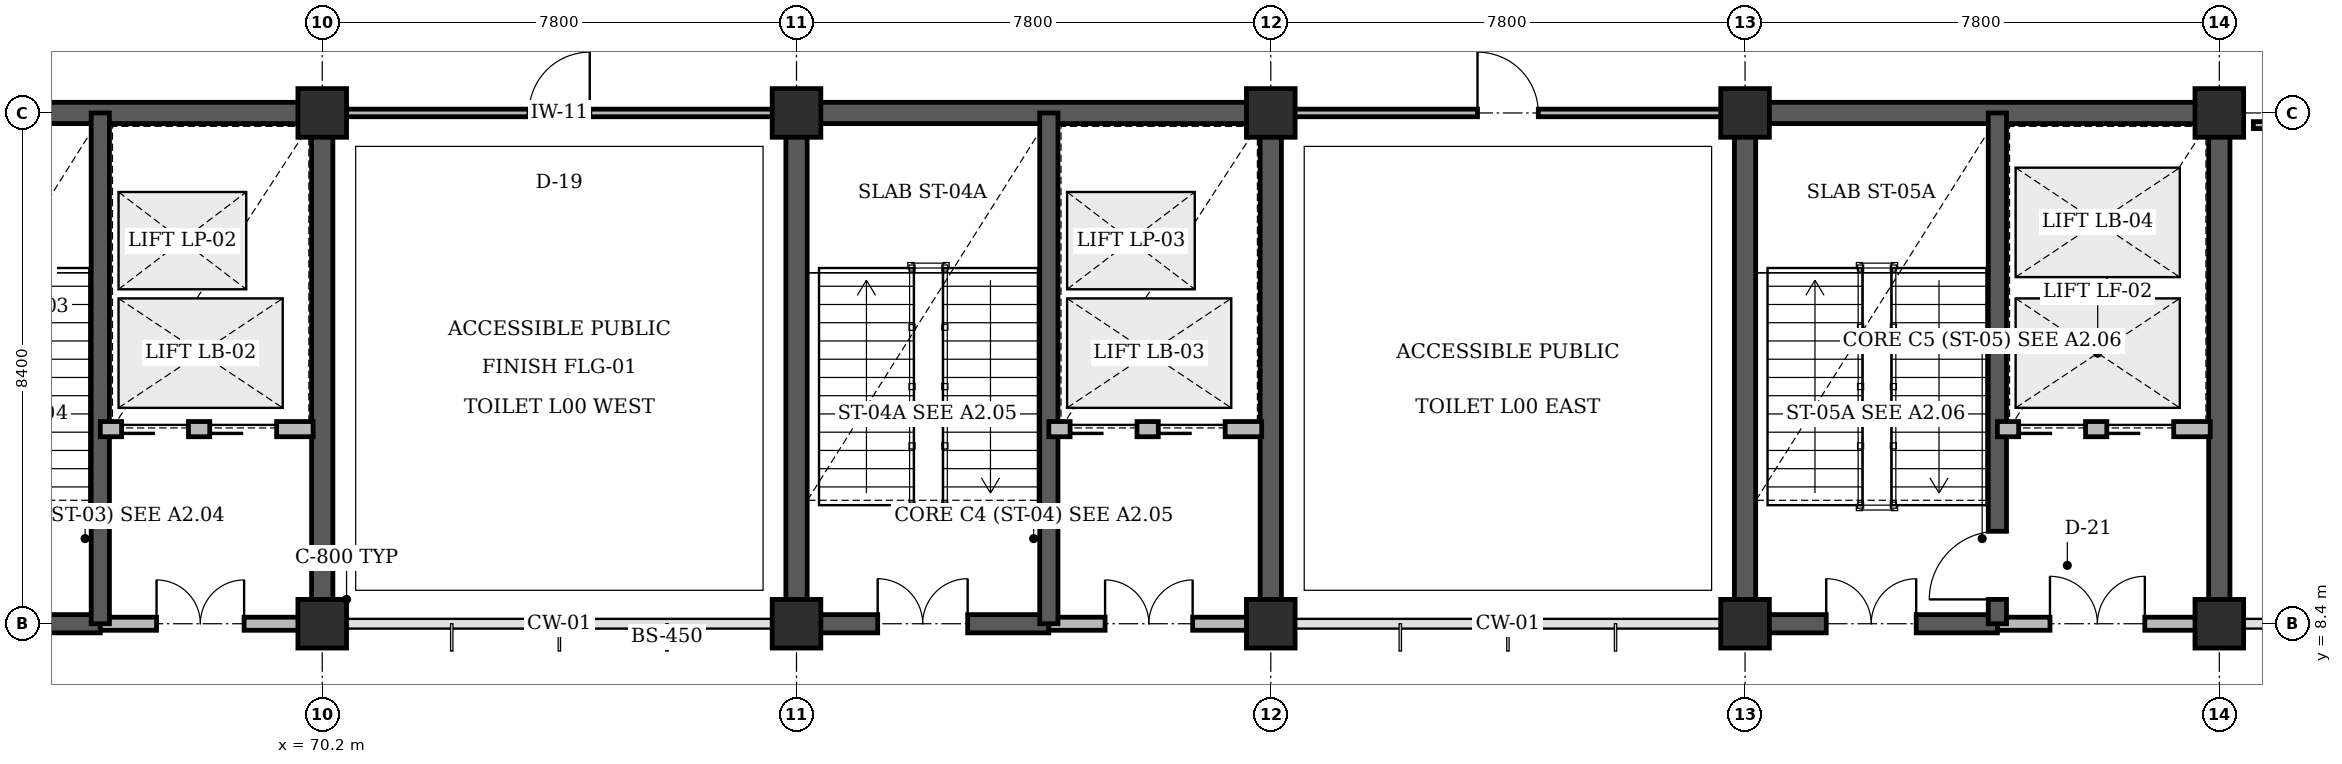
"""IFC4 building model, lengths in metres.
Left out: names, types, materials, properties, quantities, classifications, styles, units other than length and angle.
Written with IfcOpenShell. Run it as: python <this file> out.ifc"""

import sys

from ifc_helpers import new_model, si_unit, direction, frame, frame_2d, origin, origin_2d, place, context, subcontext, project, spatial, rectangle, extrude, element, fill, save


model = new_model("IFC4")
c1 = context("Model", 3, precision=1e-05, world=origin(), true_north=direction((0.0, 1.0)))
c2 = subcontext(c1, "Body", "Model", "MODEL_VIEW")
j1 = project(units=[si_unit("LENGTHUNIT", "METRE"), si_unit("PLANEANGLEUNIT", "RADIAN")], contexts=[c1])
p1 = place(None, origin())
s1 = spatial("IfcSite", under=j1, at=p1, CompositionType="ELEMENT")
p2 = place(p1, origin())
s2 = spatial("IfcBuilding", under=s1, at=p2, CompositionType="ELEMENT")
p3 = place(p2, origin())
s3 = spatial("IfcBuildingStorey", under=s2, at=p3, CompositionType="ELEMENT", Elevation=0.0)
p4 = place(p3, frame((62.225, 16.8, 0.0), z_axis=(0.0, 0.0, 1.0), x_axis=(1.0, 0.0, 0.0)))
e1 = element("IfcWall", 1, at=p4, inside=s3, PredefinedType="SHEAR", context=c2, shape_type="SweptSolid", body=[
    extrude(rectangle(XDim=8.15, YDim=0.35, at=frame_2d((4.075, 0.0))), origin(), (0.0, 0.0, 1.0), 4.48),
])
p5 = place(p3, frame((70.2, 8.4, 0.0), z_axis=(0.0, 0.0, 1.0), x_axis=(0.0, 1.0, 0.0)))
e2 = element("IfcWall", 2, at=p5, inside=s3, PredefinedType="SHEAR", context=c2, shape_type="SweptSolid", body=[
    extrude(rectangle(XDim=8.4, YDim=0.35, at=frame_2d((4.2, 0.0))), origin(), (0.0, 0.0, 1.0), 4.48),
])
p6 = place(p3, frame((77.825, 16.8, 0.0), z_axis=(0.0, 0.0, 1.0), x_axis=(1.0, 0.0, 0.0)))
e3 = element("IfcWall", 3, at=p6, inside=s3, PredefinedType="SHEAR", context=c2, shape_type="SweptSolid", body=[
    extrude(rectangle(XDim=8.15, YDim=0.35, at=frame_2d((4.075, 0.0))), origin(), (0.0, 0.0, 1.0), 4.48),
])
for number, where, z_axis, x_axis in (
    (4, (78.0, 8.4, 0.0), (0.0, 0.0, 1.0), (0.0, 1.0, 0.0)),
    (5, (85.8, 8.4, 0.0), (0.0, 0.0, 1.0), (0.0, 1.0, 0.0)),
):
    element("IfcWall", number, at=place(p3, frame(where, z_axis=z_axis, x_axis=x_axis)), inside=s3, PredefinedType="SHEAR", context=c2, shape_type="SweptSolid", body=[
        extrude(rectangle(XDim=8.4, YDim=0.35, at=frame_2d((4.2, 0.0))), origin(), (0.0, 0.0, 1.0), 4.48),
    ])
p7 = place(p3, frame((93.425, 16.8, 0.0), z_axis=(0.0, 0.0, 1.0), x_axis=(1.0, 0.0, 0.0)))
e6 = element("IfcWall", 6, at=p7, inside=s3, PredefinedType="SHEAR", context=c2, shape_type="SweptSolid", body=[
    extrude(rectangle(XDim=8.15, YDim=0.35, at=frame_2d((4.075, 0.0))), origin(), (0.0, 0.0, 1.0), 4.48),
])
for number, where, z_axis, x_axis in (
    (7, (93.6, 8.4, 0.0), (0.0, 0.0, 1.0), (0.0, 1.0, 0.0)),
    (8, (101.4, 8.4, 0.0), (0.0, 0.0, 1.0), (0.0, 1.0, 0.0)),
):
    element("IfcWall", number, at=place(p3, frame(where, z_axis=z_axis, x_axis=x_axis)), inside=s3, PredefinedType="SHEAR", context=c2, shape_type="SweptSolid", body=[
        extrude(rectangle(XDim=8.4, YDim=0.35, at=frame_2d((4.2, 0.0))), origin(), (0.0, 0.0, 1.0), 4.48),
    ])
for number, where, z_axis, x_axis in (
    (9, (70.2, 8.4, 0.0), (0.0, 0.0, 1.0), (1.0, 0.0, 0.0)),
    (10, (70.2, 16.8, 0.0), (0.0, 0.0, 1.0), (1.0, 0.0, 0.0)),
    (11, (78.0, 8.4, 0.0), (0.0, 0.0, 1.0), (1.0, 0.0, 0.0)),
    (12, (78.0, 16.8, 0.0), (0.0, 0.0, 1.0), (1.0, 0.0, 0.0)),
    (13, (85.8, 8.4, 0.0), (0.0, 0.0, 1.0), (1.0, 0.0, 0.0)),
    (14, (85.8, 16.8, 0.0), (0.0, 0.0, 1.0), (1.0, 0.0, 0.0)),
    (15, (93.6, 8.4, 0.0), (0.0, 0.0, 1.0), (1.0, 0.0, 0.0)),
    (16, (93.6, 16.8, 0.0), (0.0, 0.0, 1.0), (1.0, 0.0, 0.0)),
    (17, (101.4, 8.4, 0.0), (0.0, 0.0, 1.0), (1.0, 0.0, 0.0)),
    (18, (101.4, 16.8, 0.0), (0.0, 0.0, 1.0), (1.0, 0.0, 0.0)),
):
    element("IfcColumn", number, at=place(p3, frame(where, z_axis=z_axis, x_axis=x_axis)), inside=s3, PredefinedType="COLUMN", context=c2, shape_type="SweptSolid", body=[
        extrude(rectangle(XDim=0.8, YDim=0.8, at=origin_2d()), origin(), (0.0, 0.0, 1.0), 4.8),
    ])
p8 = place(p3, frame((62.4, 8.4, 0.0), z_axis=(0.0, 0.0, 1.0), x_axis=(1.0, 0.0, 0.0)))
e19 = element("IfcWall", 19, at=p8, inside=s3, PredefinedType="SHEAR", context=c2, shape_type="SweptSolid", body=[
    extrude(rectangle(XDim=4.15, YDim=0.3, at=frame_2d((2.075, 0.0))), origin(), (0.0, 0.0, 1.0), 4.8),
])
p9 = place(p8, frame((1.335, 0.0, 0.0)))
e20 = element("IfcOpeningElement", 20, at=p9, cuts=e19, PredefinedType="OPENING", context=c2, shape_type="SweptSolid", body=[
    extrude(rectangle(XDim=1.48, YDim=2.2, at=frame_2d((0.74, 1.1))), frame((0.0, 0.16, 0.0), z_axis=(0.0, -1.0, 0.0), x_axis=(1.0, 0.0, 0.0)), (0.0, 0.0, 1.0), 0.32),
])
p10 = place(p3, frame((66.55, 8.4, 0.0), z_axis=(0.0, 0.0, 1.0), x_axis=(1.0, 0.0, 0.0)))
e21 = element("IfcWall", 21, at=p10, inside=s3, PredefinedType="STANDARD", context=c2, shape_type="SweptSolid", body=[
    extrude(rectangle(XDim=3.29, YDim=0.215, at=frame_2d((1.645, 0.0))), origin(), (0.0, 0.0, 1.0), 3.63),
])
p11 = place(p10, frame((0.925, 0.0, 0.0)))
e22 = element("IfcOpeningElement", 22, at=p11, cuts=e21, PredefinedType="OPENING", context=c2, shape_type="SweptSolid", body=[
    extrude(rectangle(XDim=1.44, YDim=2.2, at=frame_2d((0.72, 1.1))), frame((0.0, 0.118, 0.0), z_axis=(0.0, -1.0, 0.0), x_axis=(1.0, 0.0, 0.0)), (0.0, 0.0, 1.0), 0.235),
])
p12 = place(p3, frame((66.55, 8.4, 0.0), z_axis=(0.0, 0.0, 1.0), x_axis=(0.0, 1.0, 0.0)))
e23 = element("IfcWall", 23, at=p12, inside=s3, PredefinedType="SHEAR", context=c2, shape_type="SweptSolid", body=[
    extrude(rectangle(XDim=8.4, YDim=0.3, at=frame_2d((4.2, 0.0))), origin(), (0.0, 0.0, 1.0), 4.8),
])
p13 = place(p3, frame((66.55, 11.6, 0.0), z_axis=(0.0, 0.0, 1.0), x_axis=(1.0, 0.0, 0.0)))
e24 = element("IfcWall", 24, at=p13, inside=s3, PredefinedType="STANDARD", context=c2, shape_type="SweptSolid", body=[
    extrude(rectangle(XDim=3.5, YDim=0.25, at=frame_2d((1.75, 0.0))), origin(), (0.0, 0.0, 1.0), 4.46),
])
p14 = place(p13, frame((0.35, 0.0, 0.0)))
e25 = element("IfcOpeningElement", 25, at=p14, cuts=e24, PredefinedType="OPENING", context=c2, shape_type="SweptSolid", body=[
    extrude(rectangle(XDim=1.1, YDim=2.2, at=frame_2d((0.55, 1.1))), frame((0.0, 0.135, 0.0), z_axis=(0.0, -1.0, 0.0), x_axis=(1.0, 0.0, 0.0)), (0.0, 0.0, 1.0), 0.27),
])
p15 = place(p13, frame((1.8, 0.0, 0.0)))
e26 = element("IfcOpeningElement", 26, at=p15, cuts=e24, PredefinedType="OPENING", context=c2, shape_type="SweptSolid", body=[
    extrude(rectangle(XDim=1.1, YDim=2.2, at=frame_2d((0.55, 1.1))), frame((0.0, 0.135, 0.0), z_axis=(0.0, -1.0, 0.0), x_axis=(1.0, 0.0, 0.0)), (0.0, 0.0, 1.0), 0.27),
])
p16 = place(p3, frame((78.0, 8.4, 0.0), z_axis=(0.0, 0.0, 1.0), x_axis=(1.0, 0.0, 0.0)))
e27 = element("IfcWall", 27, at=p16, inside=s3, PredefinedType="SHEAR", context=c2, shape_type="SweptSolid", body=[
    extrude(rectangle(XDim=4.15, YDim=0.3, at=frame_2d((2.075, 0.0))), origin(), (0.0, 0.0, 1.0), 4.8),
])
p17 = place(p16, frame((1.335, 0.0, 0.0)))
e28 = element("IfcOpeningElement", 28, at=p17, cuts=e27, PredefinedType="OPENING", context=c2, shape_type="SweptSolid", body=[
    extrude(rectangle(XDim=1.48, YDim=2.2, at=frame_2d((0.74, 1.1))), frame((0.0, 0.16, 0.0), z_axis=(0.0, -1.0, 0.0), x_axis=(1.0, 0.0, 0.0)), (0.0, 0.0, 1.0), 0.32),
])
p18 = place(p3, frame((82.15, 8.4, 0.0), z_axis=(0.0, 0.0, 1.0), x_axis=(1.0, 0.0, 0.0)))
e29 = element("IfcWall", 29, at=p18, inside=s3, PredefinedType="STANDARD", context=c2, shape_type="SweptSolid", body=[
    extrude(rectangle(XDim=3.29, YDim=0.215, at=frame_2d((1.645, 0.0))), origin(), (0.0, 0.0, 1.0), 3.63),
])
p19 = place(p18, frame((0.925, 0.0, 0.0)))
e30 = element("IfcOpeningElement", 30, at=p19, cuts=e29, PredefinedType="OPENING", context=c2, shape_type="SweptSolid", body=[
    extrude(rectangle(XDim=1.44, YDim=2.2, at=frame_2d((0.72, 1.1))), frame((0.0, 0.118, 0.0), z_axis=(0.0, -1.0, 0.0), x_axis=(1.0, 0.0, 0.0)), (0.0, 0.0, 1.0), 0.235),
])
p20 = place(p3, frame((82.15, 8.4, 0.0), z_axis=(0.0, 0.0, 1.0), x_axis=(0.0, 1.0, 0.0)))
e31 = element("IfcWall", 31, at=p20, inside=s3, PredefinedType="SHEAR", context=c2, shape_type="SweptSolid", body=[
    extrude(rectangle(XDim=8.4, YDim=0.3, at=frame_2d((4.2, 0.0))), origin(), (0.0, 0.0, 1.0), 4.8),
])
p21 = place(p3, frame((82.15, 11.6, 0.0), z_axis=(0.0, 0.0, 1.0), x_axis=(1.0, 0.0, 0.0)))
e32 = element("IfcWall", 32, at=p21, inside=s3, PredefinedType="STANDARD", context=c2, shape_type="SweptSolid", body=[
    extrude(rectangle(XDim=3.5, YDim=0.25, at=frame_2d((1.75, 0.0))), origin(), (0.0, 0.0, 1.0), 4.46),
])
p22 = place(p21, frame((0.35, 0.0, 0.0)))
e33 = element("IfcOpeningElement", 33, at=p22, cuts=e32, PredefinedType="OPENING", context=c2, shape_type="SweptSolid", body=[
    extrude(rectangle(XDim=1.1, YDim=2.2, at=frame_2d((0.55, 1.1))), frame((0.0, 0.135, 0.0), z_axis=(0.0, -1.0, 0.0), x_axis=(1.0, 0.0, 0.0)), (0.0, 0.0, 1.0), 0.27),
])
p23 = place(p21, frame((1.8, 0.0, 0.0)))
e34 = element("IfcOpeningElement", 34, at=p23, cuts=e32, PredefinedType="OPENING", context=c2, shape_type="SweptSolid", body=[
    extrude(rectangle(XDim=1.1, YDim=2.2, at=frame_2d((0.55, 1.1))), frame((0.0, 0.135, 0.0), z_axis=(0.0, -1.0, 0.0), x_axis=(1.0, 0.0, 0.0)), (0.0, 0.0, 1.0), 0.27),
])
p24 = place(p3, frame((93.6, 8.4, 0.0), z_axis=(0.0, 0.0, 1.0), x_axis=(1.0, 0.0, 0.0)))
e35 = element("IfcWall", 35, at=p24, inside=s3, PredefinedType="SHEAR", context=c2, shape_type="SweptSolid", body=[
    extrude(rectangle(XDim=4.15, YDim=0.3, at=frame_2d((2.075, 0.0))), origin(), (0.0, 0.0, 1.0), 4.8),
])
p25 = place(p24, frame((1.335, 0.0, 0.0)))
e36 = element("IfcOpeningElement", 36, at=p25, cuts=e35, PredefinedType="OPENING", context=c2, shape_type="SweptSolid", body=[
    extrude(rectangle(XDim=1.48, YDim=2.2, at=frame_2d((0.74, 1.1))), frame((0.0, 0.16, 0.0), z_axis=(0.0, -1.0, 0.0), x_axis=(1.0, 0.0, 0.0)), (0.0, 0.0, 1.0), 0.32),
])
p26 = place(p3, frame((97.75, 8.4, 0.0), z_axis=(0.0, 0.0, 1.0), x_axis=(1.0, 0.0, 0.0)))
e37 = element("IfcWall", 37, at=p26, inside=s3, PredefinedType="STANDARD", context=c2, shape_type="SweptSolid", body=[
    extrude(rectangle(XDim=3.29, YDim=0.215, at=frame_2d((1.645, 0.0))), origin(), (0.0, 0.0, 1.0), 3.63),
])
p27 = place(p26, frame((0.865, 0.0, 0.0)))
e38 = element("IfcOpeningElement", 38, at=p27, cuts=e37, PredefinedType="OPENING", context=c2, shape_type="SweptSolid", body=[
    extrude(rectangle(XDim=1.56, YDim=2.2, at=frame_2d((0.78, 1.1))), frame((0.0, 0.118, 0.0), z_axis=(0.0, -1.0, 0.0), x_axis=(1.0, 0.0, 0.0)), (0.0, 0.0, 1.0), 0.235),
])
p28 = place(p3, frame((97.75, 8.4, 0.0), z_axis=(0.0, 0.0, 1.0), x_axis=(0.0, 1.0, 0.0)))
e39 = element("IfcWall", 39, at=p28, inside=s3, PredefinedType="SHEAR", context=c2, shape_type="SweptSolid", body=[
    extrude(rectangle(XDim=8.4, YDim=0.3, at=frame_2d((4.2, 0.0))), origin(), (0.0, 0.0, 1.0), 4.8),
])
p29 = place(p28, frame((0.4, 0.0, 0.0)))
e40 = element("IfcOpeningElement", 40, at=p29, cuts=e39, PredefinedType="OPENING", context=c2, shape_type="SweptSolid", body=[
    extrude(rectangle(XDim=1.12, YDim=2.15, at=frame_2d((0.56, 1.075))), frame((0.0, 0.16, 0.0), z_axis=(0.0, -1.0, 0.0), x_axis=(1.0, 0.0, 0.0)), (0.0, 0.0, 1.0), 0.32),
])
p30 = place(p3, frame((97.75, 11.6, 0.0), z_axis=(0.0, 0.0, 1.0), x_axis=(1.0, 0.0, 0.0)))
e41 = element("IfcWall", 41, at=p30, inside=s3, PredefinedType="STANDARD", context=c2, shape_type="SweptSolid", body=[
    extrude(rectangle(XDim=3.5, YDim=0.25, at=frame_2d((1.75, 0.0))), origin(), (0.0, 0.0, 1.0), 4.46),
])
p31 = place(p30, frame((0.35, 0.0, 0.0)))
e42 = element("IfcOpeningElement", 42, at=p31, cuts=e41, PredefinedType="OPENING", context=c2, shape_type="SweptSolid", body=[
    extrude(rectangle(XDim=1.1, YDim=2.2, at=frame_2d((0.55, 1.1))), frame((0.0, 0.135, 0.0), z_axis=(0.0, -1.0, 0.0), x_axis=(1.0, 0.0, 0.0)), (0.0, 0.0, 1.0), 0.27),
])
p32 = place(p30, frame((1.8, 0.0, 0.0)))
e43 = element("IfcOpeningElement", 43, at=p32, cuts=e41, PredefinedType="OPENING", context=c2, shape_type="SweptSolid", body=[
    extrude(rectangle(XDim=1.1, YDim=2.2, at=frame_2d((0.55, 1.1))), frame((0.0, 0.135, 0.0), z_axis=(0.0, -1.0, 0.0), x_axis=(1.0, 0.0, 0.0)), (0.0, 0.0, 1.0), 0.27),
])
p33 = place(p3, frame((70.56, 16.8, 0.0), z_axis=(0.0, 0.0, 1.0), x_axis=(1.0, 0.0, 0.0)))
e44 = element("IfcWall", 44, at=p33, inside=s3, PredefinedType="PARTITIONING", context=c2, shape_type="SweptSolid", body=[
    extrude(rectangle(XDim=7.08, YDim=0.125, at=frame_2d((3.54, 0.0))), origin(), (0.0, 0.0, 1.0), 3.63),
])
p34 = place(p33, frame((3.04, 0.0, 0.0)))
e45 = element("IfcOpeningElement", 45, at=p34, cuts=e44, PredefinedType="OPENING", context=c2, shape_type="SweptSolid", body=[
    extrude(rectangle(XDim=1.0, YDim=2.1, at=frame_2d((0.5, 1.05))), frame((0.0, 0.073, 0.0), z_axis=(0.0, -1.0, 0.0), x_axis=(1.0, 0.0, 0.0)), (0.0, 0.0, 1.0), 0.145),
])
p35 = place(p3, frame((86.16, 16.8, 0.0), z_axis=(0.0, 0.0, 1.0), x_axis=(1.0, 0.0, 0.0)))
e46 = element("IfcWall", 46, at=p35, inside=s3, PredefinedType="PARTITIONING", context=c2, shape_type="SweptSolid", body=[
    extrude(rectangle(XDim=7.08, YDim=0.125, at=frame_2d((3.54, 0.0))), origin(), (0.0, 0.0, 1.0), 3.63),
])
p36 = place(p35, frame((3.04, 0.0, 0.0)))
e47 = element("IfcOpeningElement", 47, at=p36, cuts=e46, PredefinedType="OPENING", context=c2, shape_type="SweptSolid", body=[
    extrude(rectangle(XDim=1.0, YDim=2.1, at=frame_2d((0.5, 1.05))), frame((0.0, 0.073, 0.0), z_axis=(0.0, -1.0, 0.0), x_axis=(1.0, 0.0, 0.0)), (0.0, 0.0, 1.0), 0.145),
])
p37 = place(p3, frame((101.96, 16.6, 0.0), z_axis=(0.0, 0.0, 1.0), x_axis=(1.0, 0.0, 0.0)))
e48 = element("IfcWall", 48, at=p37, inside=s3, PredefinedType="PARTITIONING", context=c2, shape_type="SweptSolid", body=[
    extrude(rectangle(XDim=30.24, YDim=0.115, at=frame_2d((15.12, 0.0))), origin(), (0.0, 0.0, 1.0), 3.63),
])
p38 = place(p37, frame((11.436, 0.0, 0.0)))
e49 = element("IfcOpeningElement", 49, at=p38, cuts=e48, PredefinedType="OPENING", context=c2, shape_type="SweptSolid", body=[
    extrude(rectangle(XDim=1.32, YDim=2.15, at=frame_2d((0.66, 1.075))), frame((0.0, 0.067, 0.0), z_axis=(0.0, -1.0, 0.0), x_axis=(1.0, 0.0, 0.0)), (0.0, 0.0, 1.0), 0.135),
])
p39 = place(p11, origin())
e50 = element("IfcDoor", 50, at=p39, inside=s3, OperationType="DOUBLE_DOOR_SINGLE_SWING", PredefinedType="DOOR", context=c2, shape_type="SweptSolid", body=[
    extrude(rectangle(XDim=1.44, YDim=2.2, at=frame_2d((0.72, 1.1))), frame((0.0, 0.025, 0.0), z_axis=(0.0, -1.0, 0.0), x_axis=(1.0, 0.0, 0.0)), (0.0, 0.0, 1.0), 0.05),
])
fill(e22, e50)
p40 = place(p14, origin())
e51 = element("IfcDoor", 51, at=p40, inside=s3, OperationType="SLIDING_TO_LEFT", PredefinedType="DOOR", context=c2, shape_type="SweptSolid", body=[
    extrude(rectangle(XDim=1.1, YDim=2.2, at=frame_2d((0.55, 1.1))), frame((0.0, 0.025, 0.0), z_axis=(0.0, -1.0, 0.0), x_axis=(1.0, 0.0, 0.0)), (0.0, 0.0, 1.0), 0.05),
])
fill(e25, e51)
p41 = place(p15, origin())
e52 = element("IfcDoor", 52, at=p41, inside=s3, OperationType="SLIDING_TO_LEFT", PredefinedType="DOOR", context=c2, shape_type="SweptSolid", body=[
    extrude(rectangle(XDim=1.1, YDim=2.2, at=frame_2d((0.55, 1.1))), frame((0.0, 0.025, 0.0), z_axis=(0.0, -1.0, 0.0), x_axis=(1.0, 0.0, 0.0)), (0.0, 0.0, 1.0), 0.05),
])
fill(e26, e52)
p42 = place(p17, origin())
e53 = element("IfcDoor", 53, at=p42, inside=s3, OperationType="DOUBLE_DOOR_SINGLE_SWING", PredefinedType="DOOR", context=c2, shape_type="SweptSolid", body=[
    extrude(rectangle(XDim=1.48, YDim=2.2, at=frame_2d((0.74, 1.1))), frame((0.0, 0.025, 0.0), z_axis=(0.0, -1.0, 0.0), x_axis=(1.0, 0.0, 0.0)), (0.0, 0.0, 1.0), 0.05),
])
fill(e28, e53)
p43 = place(p19, origin())
e54 = element("IfcDoor", 54, at=p43, inside=s3, OperationType="DOUBLE_DOOR_SINGLE_SWING", PredefinedType="DOOR", context=c2, shape_type="SweptSolid", body=[
    extrude(rectangle(XDim=1.44, YDim=2.2, at=frame_2d((0.72, 1.1))), frame((0.0, 0.025, 0.0), z_axis=(0.0, -1.0, 0.0), x_axis=(1.0, 0.0, 0.0)), (0.0, 0.0, 1.0), 0.05),
])
fill(e30, e54)
p44 = place(p22, origin())
e55 = element("IfcDoor", 55, at=p44, inside=s3, OperationType="SLIDING_TO_LEFT", PredefinedType="DOOR", context=c2, shape_type="SweptSolid", body=[
    extrude(rectangle(XDim=1.1, YDim=2.2, at=frame_2d((0.55, 1.1))), frame((0.0, 0.025, 0.0), z_axis=(0.0, -1.0, 0.0), x_axis=(1.0, 0.0, 0.0)), (0.0, 0.0, 1.0), 0.05),
])
fill(e33, e55)
p45 = place(p23, origin())
e56 = element("IfcDoor", 56, at=p45, inside=s3, OperationType="SLIDING_TO_LEFT", PredefinedType="DOOR", context=c2, shape_type="SweptSolid", body=[
    extrude(rectangle(XDim=1.1, YDim=2.2, at=frame_2d((0.55, 1.1))), frame((0.0, 0.025, 0.0), z_axis=(0.0, -1.0, 0.0), x_axis=(1.0, 0.0, 0.0)), (0.0, 0.0, 1.0), 0.05),
])
fill(e34, e56)
p46 = place(p25, origin())
e57 = element("IfcDoor", 57, at=p46, inside=s3, OperationType="DOUBLE_DOOR_SINGLE_SWING", PredefinedType="DOOR", context=c2, shape_type="SweptSolid", body=[
    extrude(rectangle(XDim=1.48, YDim=2.2, at=frame_2d((0.74, 1.1))), frame((0.0, 0.025, 0.0), z_axis=(0.0, -1.0, 0.0), x_axis=(1.0, 0.0, 0.0)), (0.0, 0.0, 1.0), 0.05),
])
fill(e36, e57)
p47 = place(p27, origin())
e58 = element("IfcDoor", 58, at=p47, inside=s3, OperationType="DOUBLE_DOOR_SINGLE_SWING", PredefinedType="DOOR", context=c2, shape_type="SweptSolid", body=[
    extrude(rectangle(XDim=1.56, YDim=2.2, at=frame_2d((0.78, 1.1))), frame((0.0, 0.025, 0.0), z_axis=(0.0, -1.0, 0.0), x_axis=(1.0, 0.0, 0.0)), (0.0, 0.0, 1.0), 0.05),
])
fill(e38, e58)
p48 = place(p29, origin())
e59 = element("IfcDoor", 59, at=p48, inside=s3, OperationType="SINGLE_SWING_LEFT", PredefinedType="DOOR", context=c2, shape_type="SweptSolid", body=[
    extrude(rectangle(XDim=1.12, YDim=2.15, at=frame_2d((0.56, 1.075))), frame((0.0, 0.025, 0.0), z_axis=(0.0, -1.0, 0.0), x_axis=(1.0, 0.0, 0.0)), (0.0, 0.0, 1.0), 0.05),
])
fill(e40, e59)
p49 = place(p31, origin())
e60 = element("IfcDoor", 60, at=p49, inside=s3, OperationType="SLIDING_TO_LEFT", PredefinedType="DOOR", context=c2, shape_type="SweptSolid", body=[
    extrude(rectangle(XDim=1.1, YDim=2.2, at=frame_2d((0.55, 1.1))), frame((0.0, 0.025, 0.0), z_axis=(0.0, -1.0, 0.0), x_axis=(1.0, 0.0, 0.0)), (0.0, 0.0, 1.0), 0.05),
])
fill(e42, e60)
p50 = place(p32, origin())
e61 = element("IfcDoor", 61, at=p50, inside=s3, OperationType="SLIDING_TO_LEFT", PredefinedType="DOOR", context=c2, shape_type="SweptSolid", body=[
    extrude(rectangle(XDim=1.1, YDim=2.2, at=frame_2d((0.55, 1.1))), frame((0.0, 0.025, 0.0), z_axis=(0.0, -1.0, 0.0), x_axis=(1.0, 0.0, 0.0)), (0.0, 0.0, 1.0), 0.05),
])
fill(e43, e61)
p51 = place(p34, origin())
e62 = element("IfcDoor", 62, at=p51, inside=s3, OperationType="SINGLE_SWING_RIGHT", PredefinedType="DOOR", context=c2, shape_type="SweptSolid", body=[
    extrude(rectangle(XDim=1.0, YDim=2.1, at=frame_2d((0.5, 1.05))), frame((0.0, 0.025, 0.0), z_axis=(0.0, -1.0, 0.0), x_axis=(1.0, 0.0, 0.0)), (0.0, 0.0, 1.0), 0.05),
])
fill(e45, e62)
p52 = place(p36, origin())
e63 = element("IfcDoor", 63, at=p52, inside=s3, OperationType="SINGLE_SWING_LEFT", PredefinedType="DOOR", context=c2, shape_type="SweptSolid", body=[
    extrude(rectangle(XDim=1.0, YDim=2.1, at=frame_2d((0.5, 1.05))), frame((0.0, 0.025, 0.0), z_axis=(0.0, -1.0, 0.0), x_axis=(1.0, 0.0, 0.0)), (0.0, 0.0, 1.0), 0.05),
])
fill(e47, e63)
save(model, sys.argv[1])
